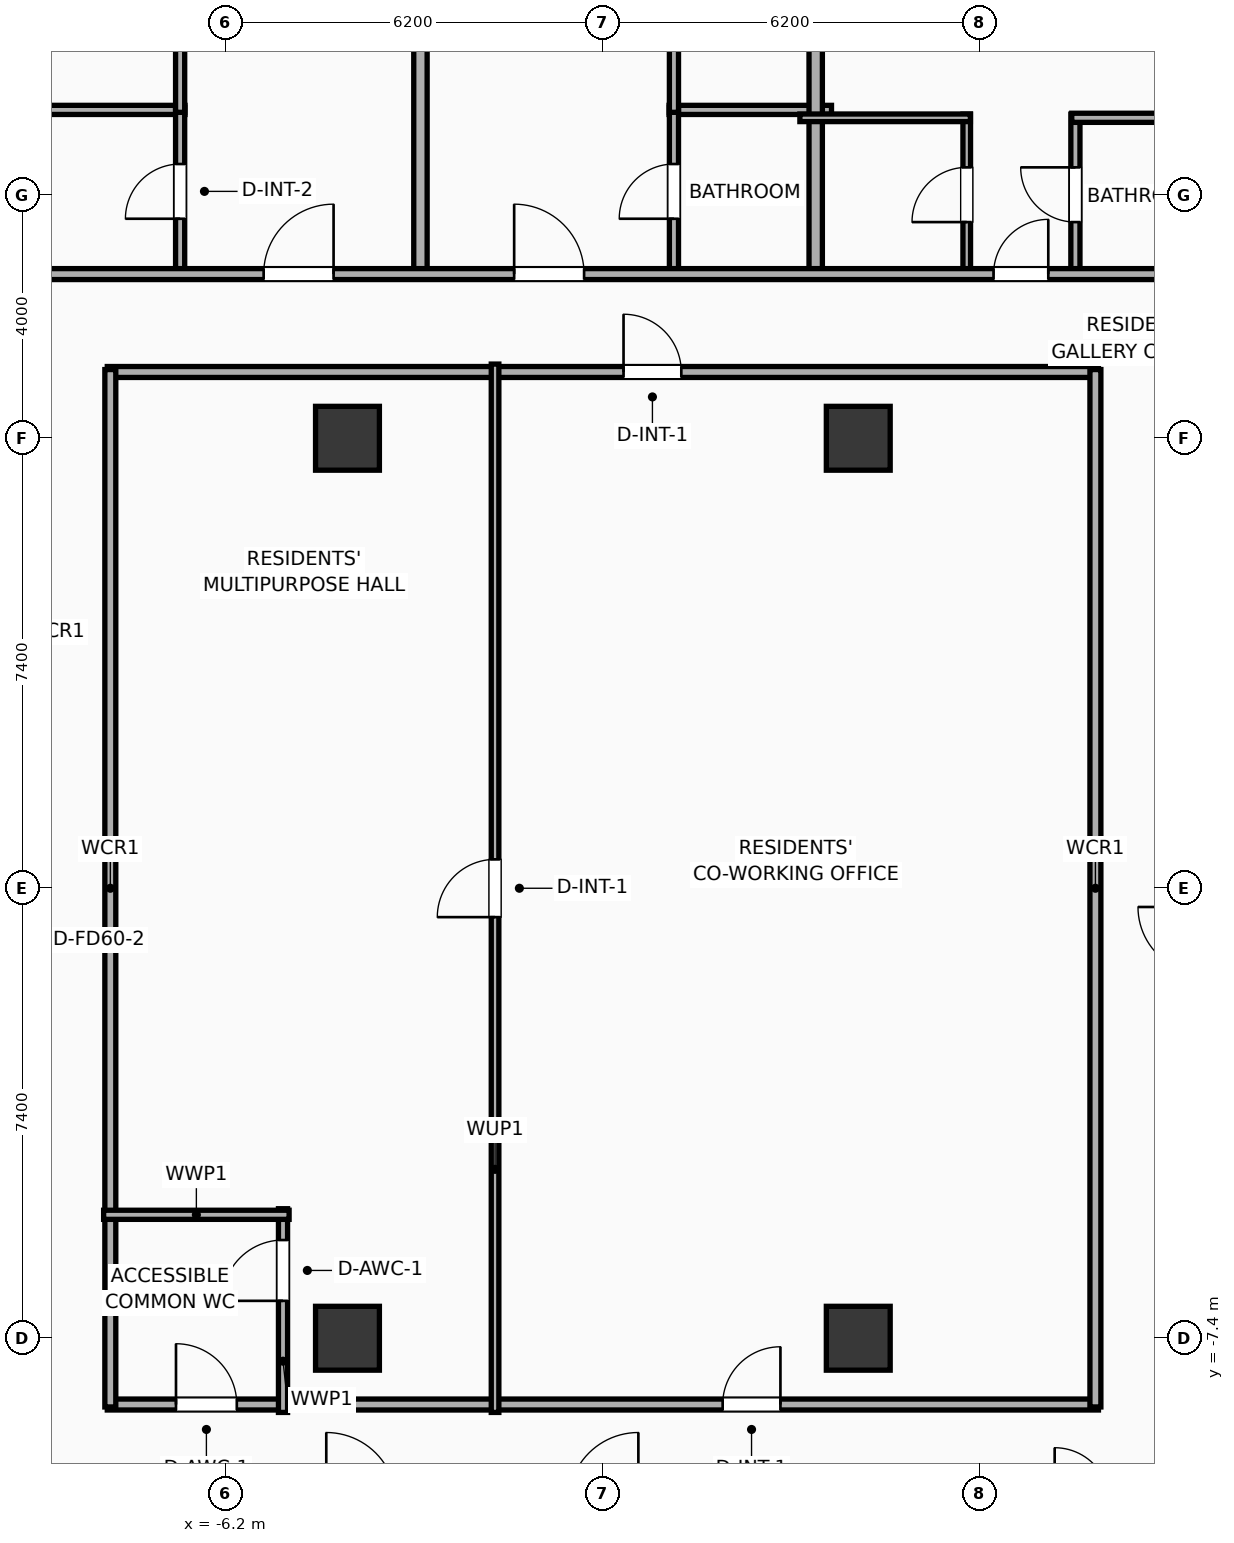
"""IFC4 building model, lengths in metres.
Left out: names, types, materials, properties, quantities, classifications, styles, units other than length and angle.
Written with IfcOpenShell. Run it as: python <this file> out.ifc"""

import sys

from ifc_helpers import new_model, si_unit, direction, frame, frame_2d, origin, origin_2d, place, context, subcontext, project, spatial, rectangle, extrude, element, fill, save


model = new_model("IFC4")
c1 = context("Model", 3, precision=1e-05, world=origin(), true_north=direction((0.0, 1.0)))
c2 = subcontext(c1, "Body", "Model", "MODEL_VIEW")
j1 = project(units=[si_unit("LENGTHUNIT", "METRE"), si_unit("PLANEANGLEUNIT", "RADIAN")], contexts=[c1])
p1 = place(None, origin())
s1 = spatial("IfcSite", under=j1, at=p1, CompositionType="ELEMENT")
p2 = place(p1, origin())
s2 = spatial("IfcBuilding", under=s1, at=p2, CompositionType="ELEMENT")
p3 = place(p2, frame((0.0, 0.0, 128.7)))
s3 = spatial("IfcBuildingStorey", under=s2, at=p3, CompositionType="ELEMENT", Elevation=128.7)
for number, where, z_axis, x_axis in (
    (1, (-4.2, -7.4, 0.0), (0.0, 0.0, 1.0), (1.0, 0.0, 0.0)),
    (2, (-4.2, 7.4, 0.0), (0.0, 0.0, 1.0), (1.0, 0.0, 0.0)),
    (3, (4.2, -7.4, 0.0), (0.0, 0.0, 1.0), (1.0, 0.0, 0.0)),
    (4, (4.2, 7.4, 0.0), (0.0, 0.0, 1.0), (1.0, 0.0, 0.0)),
):
    element("IfcColumn", number, at=place(p3, frame(where, z_axis=z_axis, x_axis=x_axis)), inside=s3, PredefinedType="COLUMN", context=c2, shape_type="SweptSolid", body=[
        extrude(rectangle(XDim=1.05, YDim=1.05, at=origin_2d()), origin(), (0.0, 0.0, 1.0), 3.9),
    ])
p4 = place(p3, frame((-8.15, 8.49, 0.0), z_axis=(0.0, 0.0, 1.0), x_axis=(1.0, 0.0, 0.0)))
e5 = element("IfcWall", 5, at=p4, inside=s3, PredefinedType="PARTITIONING", context=c2, shape_type="SweptSolid", body=[
    extrude(rectangle(XDim=16.3, YDim=0.18, at=frame_2d((8.15, 0.0))), origin(), (0.0, 0.0, 1.0), 3.65),
])
p5 = place(p4, frame((8.49, 0.0, 0.0)))
e6 = element("IfcOpeningElement", 6, at=p5, cuts=e5, PredefinedType="OPENING", context=c2, shape_type="SweptSolid", body=[
    extrude(rectangle(XDim=0.95, YDim=2.05, at=frame_2d((0.475, 1.025))), frame((0.0, 0.1, 0.0), z_axis=(0.0, -1.0, 0.0), x_axis=(1.0, 0.0, 0.0)), (0.0, 0.0, 1.0), 0.2),
])
p6 = place(p3, frame((-8.15, -8.49, 0.0), z_axis=(0.0, 0.0, 1.0), x_axis=(1.0, 0.0, 0.0)))
e7 = element("IfcWall", 7, at=p6, inside=s3, PredefinedType="PARTITIONING", context=c2, shape_type="SweptSolid", body=[
    extrude(rectangle(XDim=16.3, YDim=0.18, at=frame_2d((8.15, 0.0))), origin(), (0.0, 0.0, 1.0), 3.65),
])
p7 = place(p6, frame((1.13, 0.0, 0.0)))
e8 = element("IfcOpeningElement", 8, at=p7, cuts=e7, PredefinedType="OPENING", context=c2, shape_type="SweptSolid", body=[
    extrude(rectangle(XDim=1.0, YDim=2.05, at=frame_2d((0.5, 1.025))), frame((0.0, 0.1, 0.0), z_axis=(0.0, -1.0, 0.0), x_axis=(1.0, 0.0, 0.0)), (0.0, 0.0, 1.0), 0.2),
])
p8 = place(p6, frame((10.12, 0.0, 0.0)))
e9 = element("IfcOpeningElement", 9, at=p8, cuts=e7, PredefinedType="OPENING", context=c2, shape_type="SweptSolid", body=[
    extrude(rectangle(XDim=0.95, YDim=2.05, at=frame_2d((0.475, 1.025))), frame((0.0, 0.1, 0.0), z_axis=(0.0, -1.0, 0.0), x_axis=(1.0, 0.0, 0.0)), (0.0, 0.0, 1.0), 0.2),
])
for number, where, z_axis, x_axis in (
    (10, (-8.1, -8.53, 0.0), (0.0, 0.0, 1.0), (0.0, 1.0, 0.0)),
    (11, (8.1, -8.53, 0.0), (0.0, 0.0, 1.0), (0.0, 1.0, 0.0)),
):
    element("IfcWall", number, at=place(p3, frame(where, z_axis=z_axis, x_axis=x_axis)), inside=s3, PredefinedType="PARTITIONING", context=c2, shape_type="SweptSolid", body=[
        extrude(rectangle(XDim=17.06, YDim=0.18, at=frame_2d((8.53, 0.0))), origin(), (0.0, 0.0, 1.0), 3.65),
    ])
p9 = place(p3, frame((-5.26, -8.62, 0.0), z_axis=(0.0, 0.0, 1.0), x_axis=(0.0, 1.0, 0.0)))
e12 = element("IfcWall", 12, at=p9, inside=s3, PredefinedType="PLUMBINGWALL", context=c2, shape_type="SweptSolid", body=[
    extrude(rectangle(XDim=3.35, YDim=0.15, at=frame_2d((1.675, 0.0))), origin(), (0.0, 0.0, 1.0), 3.65),
])
p10 = place(p9, frame((1.835, 0.0, 0.0)))
e13 = element("IfcOpeningElement", 13, at=p10, cuts=e12, PredefinedType="OPENING", context=c2, shape_type="SweptSolid", body=[
    extrude(rectangle(XDim=1.0, YDim=2.05, at=frame_2d((0.5, 1.025))), frame((0.0, 0.085, 0.0), z_axis=(0.0, -1.0, 0.0), x_axis=(1.0, 0.0, 0.0)), (0.0, 0.0, 1.0), 0.17),
])
p11 = place(p3, frame((-8.21, -5.37, 0.0), z_axis=(0.0, 0.0, 1.0), x_axis=(1.0, 0.0, 0.0)))
e14 = element("IfcWall", 14, at=p11, inside=s3, PredefinedType="PLUMBINGWALL", context=c2, shape_type="SweptSolid", body=[
    extrude(rectangle(XDim=3.05, YDim=0.15, at=frame_2d((1.525, 0.0))), origin(), (0.0, 0.0, 1.0), 3.65),
])
p12 = place(p3, frame((-1.773, -8.62, 0.0), z_axis=(0.0, 0.0, 1.0), x_axis=(0.0, 1.0, 0.0)))
e15 = element("IfcWall", 15, at=p12, inside=s3, PredefinedType="PARTITIONING", context=c2, shape_type="SweptSolid", body=[
    extrude(rectangle(XDim=17.24, YDim=0.125, at=frame_2d((8.62, 0.0))), origin(), (0.0, 0.0, 1.0), 3.65),
])
p13 = place(p12, frame((8.145, 0.0, 0.0)))
e16 = element("IfcOpeningElement", 16, at=p13, cuts=e15, PredefinedType="OPENING", context=c2, shape_type="SweptSolid", body=[
    extrude(rectangle(XDim=0.95, YDim=2.05, at=frame_2d((0.475, 1.025))), frame((0.0, 0.073, 0.0), z_axis=(0.0, -1.0, 0.0), x_axis=(1.0, 0.0, 0.0)), (0.0, 0.0, 1.0), 0.145),
])
p14 = place(p3, frame((-9.76, 12.8, 0.0), z_axis=(0.0, 0.0, 1.0), x_axis=(1.0, 0.0, 0.0)))
e17 = element("IfcWall", 17, at=p14, inside=s3, PredefinedType="PLUMBINGWALL", context=c2, shape_type="SweptSolid", body=[
    extrude(rectangle(XDim=2.888, YDim=0.15, at=frame_2d((1.444, 0.0))), origin(), (0.0, 0.0, 1.0), 3.65),
])
p15 = place(p3, frame((-6.952, 10.08, 0.0), z_axis=(0.0, 0.0, 1.0), x_axis=(0.0, 1.0, 0.0)))
e18 = element("IfcWall", 18, at=p15, inside=s3, PredefinedType="PLUMBINGWALL", context=c2, shape_type="SweptSolid", body=[
    extrude(rectangle(XDim=2.76, YDim=0.15, at=frame_2d((1.38, 0.0))), origin(), (0.0, 0.0, 1.0), 3.65),
])
p16 = place(p15, frame((0.93, 0.0, 0.0)))
e19 = element("IfcOpeningElement", 19, at=p16, cuts=e18, PredefinedType="OPENING", context=c2, shape_type="SweptSolid", body=[
    extrude(rectangle(XDim=0.9, YDim=2.05, at=frame_2d((0.45, 1.025))), frame((0.0, 0.085, 0.0), z_axis=(0.0, -1.0, 0.0), x_axis=(1.0, 0.0, 0.0)), (0.0, 0.0, 1.0), 0.17),
])
p17 = place(p3, frame((-6.952, 12.76, 0.0), z_axis=(0.0, 0.0, 1.0), x_axis=(0.0, 1.0, 0.0)))
e20 = element("IfcWall", 20, at=p17, inside=s3, PredefinedType="PLUMBINGWALL", context=c2, shape_type="SweptSolid", body=[
    extrude(rectangle(XDim=8.898, YDim=0.15, at=frame_2d((4.449, 0.0))), origin(), (0.0, 0.0, 1.0), 3.65),
])
p18 = place(p17, frame((3.999, 0.0, 0.0)))
e21 = element("IfcOpeningElement", 21, at=p18, cuts=e20, PredefinedType="OPENING", context=c2, shape_type="SweptSolid", body=[
    extrude(rectangle(XDim=0.9, YDim=2.05, at=frame_2d((0.45, 1.025))), frame((0.0, 0.085, 0.0), z_axis=(0.0, -1.0, 0.0), x_axis=(1.0, 0.0, 0.0)), (0.0, 0.0, 1.0), 0.17),
])
p19 = place(p3, frame((-3.0, 10.02, 0.0), z_axis=(0.0, 0.0, 1.0), x_axis=(0.0, 1.0, 0.0)))
e22 = element("IfcWall", 22, at=p19, inside=s3, PredefinedType="PARTITIONING", context=c2, shape_type="SweptSolid", body=[
    extrude(rectangle(XDim=11.59, YDim=0.22, at=frame_2d((5.795, 0.0))), origin(), (0.0, 0.0, 1.0), 3.65),
])
p20 = place(p3, frame((1.089, 12.8, 0.0), z_axis=(0.0, 0.0, 1.0), x_axis=(1.0, 0.0, 0.0)))
e23 = element("IfcWall", 23, at=p20, inside=s3, PredefinedType="PLUMBINGWALL", context=c2, shape_type="SweptSolid", body=[
    extrude(rectangle(XDim=2.671, YDim=0.15, at=frame_2d((1.335, 0.0))), origin(), (0.0, 0.0, 1.0), 3.65),
])
p21 = place(p3, frame((1.169, 10.08, 0.0), z_axis=(0.0, 0.0, 1.0), x_axis=(0.0, 1.0, 0.0)))
e24 = element("IfcWall", 24, at=p21, inside=s3, PredefinedType="PLUMBINGWALL", context=c2, shape_type="SweptSolid", body=[
    extrude(rectangle(XDim=2.76, YDim=0.15, at=frame_2d((1.38, 0.0))), origin(), (0.0, 0.0, 1.0), 3.65),
])
p22 = place(p21, frame((0.93, 0.0, 0.0)))
e25 = element("IfcOpeningElement", 25, at=p22, cuts=e24, PredefinedType="OPENING", context=c2, shape_type="SweptSolid", body=[
    extrude(rectangle(XDim=0.9, YDim=2.05, at=frame_2d((0.45, 1.025))), frame((0.0, 0.085, 0.0), z_axis=(0.0, -1.0, 0.0), x_axis=(1.0, 0.0, 0.0)), (0.0, 0.0, 1.0), 0.17),
])
p23 = place(p3, frame((1.169, 12.76, 0.0), z_axis=(0.0, 0.0, 1.0), x_axis=(0.0, 1.0, 0.0)))
e26 = element("IfcWall", 26, at=p23, inside=s3, PredefinedType="PLUMBINGWALL", context=c2, shape_type="SweptSolid", body=[
    extrude(rectangle(XDim=8.898, YDim=0.15, at=frame_2d((4.449, 0.0))), origin(), (0.0, 0.0, 1.0), 3.65),
])
p24 = place(p23, frame((3.999, 0.0, 0.0)))
e27 = element("IfcOpeningElement", 27, at=p24, cuts=e26, PredefinedType="OPENING", context=c2, shape_type="SweptSolid", body=[
    extrude(rectangle(XDim=0.9, YDim=2.05, at=frame_2d((0.45, 1.025))), frame((0.0, 0.085, 0.0), z_axis=(0.0, -1.0, 0.0), x_axis=(1.0, 0.0, 0.0)), (0.0, 0.0, 1.0), 0.17),
])
p25 = place(p3, frame((3.5, 10.02, 0.0), z_axis=(0.0, 0.0, 1.0), x_axis=(0.0, 1.0, 0.0)))
e28 = element("IfcWall", 28, at=p25, inside=s3, PredefinedType="PARTITIONING", context=c2, shape_type="SweptSolid", body=[
    extrude(rectangle(XDim=11.59, YDim=0.22, at=frame_2d((5.795, 0.0))), origin(), (0.0, 0.0, 1.0), 3.65),
])
p26 = place(p3, frame((5.984, 10.08, 0.0), z_axis=(0.0, 0.0, 1.0), x_axis=(0.0, 1.0, 0.0)))
e29 = element("IfcWall", 29, at=p26, inside=s3, PredefinedType="PARTITIONING", context=c2, shape_type="SweptSolid", body=[
    extrude(rectangle(XDim=2.65, YDim=0.125, at=frame_2d((1.325, 0.0))), origin(), (0.0, 0.0, 1.0), 3.65),
])
p27 = place(p26, frame((0.875, 0.0, 0.0)))
e30 = element("IfcOpeningElement", 30, at=p27, cuts=e29, PredefinedType="OPENING", context=c2, shape_type="SweptSolid", body=[
    extrude(rectangle(XDim=0.9, YDim=2.05, at=frame_2d((0.45, 1.025))), frame((0.0, 0.073, 0.0), z_axis=(0.0, -1.0, 0.0), x_axis=(1.0, 0.0, 0.0)), (0.0, 0.0, 1.0), 0.145),
])
p28 = place(p3, frame((7.771, 10.08, 0.0), z_axis=(0.0, 0.0, 1.0), x_axis=(0.0, 1.0, 0.0)))
e31 = element("IfcWall", 31, at=p28, inside=s3, PredefinedType="PLUMBINGWALL", context=c2, shape_type="SweptSolid", body=[
    extrude(rectangle(XDim=2.65, YDim=0.15, at=frame_2d((1.325, 0.0))), origin(), (0.0, 0.0, 1.0), 3.65),
])
p29 = place(p28, frame((0.875, 0.0, 0.0)))
e32 = element("IfcOpeningElement", 32, at=p29, cuts=e31, PredefinedType="OPENING", context=c2, shape_type="SweptSolid", body=[
    extrude(rectangle(XDim=0.9, YDim=2.05, at=frame_2d((0.45, 1.025))), frame((0.0, 0.085, 0.0), z_axis=(0.0, -1.0, 0.0), x_axis=(1.0, 0.0, 0.0)), (0.0, 0.0, 1.0), 0.17),
])
p30 = place(p3, frame((3.24, 12.67, 0.0), z_axis=(0.0, 0.0, 1.0), x_axis=(1.0, 0.0, 0.0)))
e33 = element("IfcWall", 33, at=p30, inside=s3, PredefinedType="PARTITIONING", context=c2, shape_type="SweptSolid", body=[
    extrude(rectangle(XDim=2.804, YDim=0.125, at=frame_2d((1.402, 0.0))), origin(), (0.0, 0.0, 1.0), 3.65),
])
p31 = place(p3, frame((7.711, 12.67, 0.0), z_axis=(0.0, 0.0, 1.0), x_axis=(1.0, 0.0, 0.0)))
e34 = element("IfcWall", 34, at=p31, inside=s3, PredefinedType="PLUMBINGWALL", context=c2, shape_type="SweptSolid", body=[
    extrude(rectangle(XDim=2.549, YDim=0.15, at=frame_2d((1.274, 0.0))), origin(), (0.0, 0.0, 1.0), 3.65),
])
p32 = place(p3, frame((-29.21, 10.1, 0.0), z_axis=(0.0, 0.0, 1.0), x_axis=(1.0, 0.0, 0.0)))
e35 = element("IfcWall", 35, at=p32, inside=s3, PredefinedType="PARTITIONING", context=c2, shape_type="SweptSolid", body=[
    extrude(rectangle(XDim=62.42, YDim=0.18, at=frame_2d((31.21, 0.0))), origin(), (0.0, 0.0, 1.0), 3.65),
])
p33 = place(p32, frame((3.033, 0.0, 0.0)))
e36 = element("IfcOpeningElement", 36, at=p33, cuts=e35, PredefinedType="OPENING", context=c2, shape_type="SweptSolid", body=[
    extrude(rectangle(XDim=0.9, YDim=2.05, at=frame_2d((0.45, 1.025))), frame((0.0, 0.1, 0.0), z_axis=(0.0, -1.0, 0.0), x_axis=(1.0, 0.0, 0.0)), (0.0, 0.0, 1.0), 0.2),
])
p34 = place(p32, frame((10.573, 0.0, 0.0)))
e37 = element("IfcOpeningElement", 37, at=p34, cuts=e35, PredefinedType="OPENING", context=c2, shape_type="SweptSolid", body=[
    extrude(rectangle(XDim=1.15, YDim=2.05, at=frame_2d((0.575, 1.025))), frame((0.0, 0.1, 0.0), z_axis=(0.0, -1.0, 0.0), x_axis=(1.0, 0.0, 0.0)), (0.0, 0.0, 1.0), 0.2),
])
p35 = place(p32, frame((16.135, 0.0, 0.0)))
e38 = element("IfcOpeningElement", 38, at=p35, cuts=e35, PredefinedType="OPENING", context=c2, shape_type="SweptSolid", body=[
    extrude(rectangle(XDim=0.9, YDim=2.05, at=frame_2d((0.45, 1.025))), frame((0.0, 0.1, 0.0), z_axis=(0.0, -1.0, 0.0), x_axis=(1.0, 0.0, 0.0)), (0.0, 0.0, 1.0), 0.2),
])
p36 = place(p32, frame((23.632, 0.0, 0.0)))
e39 = element("IfcOpeningElement", 39, at=p36, cuts=e35, PredefinedType="OPENING", context=c2, shape_type="SweptSolid", body=[
    extrude(rectangle(XDim=1.15, YDim=2.05, at=frame_2d((0.575, 1.025))), frame((0.0, 0.1, 0.0), z_axis=(0.0, -1.0, 0.0), x_axis=(1.0, 0.0, 0.0)), (0.0, 0.0, 1.0), 0.2),
])
p37 = place(p32, frame((27.751, 0.0, 0.0)))
e40 = element("IfcOpeningElement", 40, at=p37, cuts=e35, PredefinedType="OPENING", context=c2, shape_type="SweptSolid", body=[
    extrude(rectangle(XDim=1.15, YDim=2.05, at=frame_2d((0.575, 1.025))), frame((0.0, 0.1, 0.0), z_axis=(0.0, -1.0, 0.0), x_axis=(1.0, 0.0, 0.0)), (0.0, 0.0, 1.0), 0.2),
])
p38 = place(p32, frame((35.635, 0.0, 0.0)))
e41 = element("IfcOpeningElement", 41, at=p38, cuts=e35, PredefinedType="OPENING", context=c2, shape_type="SweptSolid", body=[
    extrude(rectangle(XDim=0.9, YDim=2.05, at=frame_2d((0.45, 1.025))), frame((0.0, 0.1, 0.0), z_axis=(0.0, -1.0, 0.0), x_axis=(1.0, 0.0, 0.0)), (0.0, 0.0, 1.0), 0.2),
])
p39 = place(p32, frame((40.697, 0.0, 0.0)))
e42 = element("IfcOpeningElement", 42, at=p39, cuts=e35, PredefinedType="OPENING", context=c2, shape_type="SweptSolid", body=[
    extrude(rectangle(XDim=1.15, YDim=2.05, at=frame_2d((0.575, 1.025))), frame((0.0, 0.1, 0.0), z_axis=(0.0, -1.0, 0.0), x_axis=(1.0, 0.0, 0.0)), (0.0, 0.0, 1.0), 0.2),
])
p40 = place(p32, frame((48.637, 0.0, 0.0)))
e43 = element("IfcOpeningElement", 43, at=p40, cuts=e35, PredefinedType="OPENING", context=c2, shape_type="SweptSolid", body=[
    extrude(rectangle(XDim=0.9, YDim=2.05, at=frame_2d((0.45, 1.025))), frame((0.0, 0.1, 0.0), z_axis=(0.0, -1.0, 0.0), x_axis=(1.0, 0.0, 0.0)), (0.0, 0.0, 1.0), 0.2),
])
p41 = place(p32, frame((57.213, 0.0, 0.0)))
e44 = element("IfcOpeningElement", 44, at=p41, cuts=e35, PredefinedType="OPENING", context=c2, shape_type="SweptSolid", body=[
    extrude(rectangle(XDim=1.15, YDim=2.05, at=frame_2d((0.575, 1.025))), frame((0.0, 0.1, 0.0), z_axis=(0.0, -1.0, 0.0), x_axis=(1.0, 0.0, 0.0)), (0.0, 0.0, 1.0), 0.2),
])
p42 = place(p5, origin())
e45 = element("IfcDoor", 45, at=p42, inside=s3, OperationType="SINGLE_SWING_LEFT", PredefinedType="DOOR", context=c2, shape_type="SweptSolid", body=[
    extrude(rectangle(XDim=0.95, YDim=2.05, at=frame_2d((0.475, 1.025))), frame((0.0, 0.025, 0.0), z_axis=(0.0, -1.0, 0.0), x_axis=(1.0, 0.0, 0.0)), (0.0, 0.0, 1.0), 0.05),
])
fill(e6, e45)
p43 = place(p7, origin())
e46 = element("IfcDoor", 46, at=p43, inside=s3, OperationType="SINGLE_SWING_LEFT", PredefinedType="DOOR", context=c2, shape_type="SweptSolid", body=[
    extrude(rectangle(XDim=1.0, YDim=2.05, at=frame_2d((0.5, 1.025))), frame((0.0, 0.025, 0.0), z_axis=(0.0, -1.0, 0.0), x_axis=(1.0, 0.0, 0.0)), (0.0, 0.0, 1.0), 0.05),
])
fill(e8, e46)
p44 = place(p8, origin())
e47 = element("IfcDoor", 47, at=p44, inside=s3, OperationType="SINGLE_SWING_RIGHT", PredefinedType="DOOR", context=c2, shape_type="SweptSolid", body=[
    extrude(rectangle(XDim=0.95, YDim=2.05, at=frame_2d((0.475, 1.025))), frame((0.0, 0.025, 0.0), z_axis=(0.0, -1.0, 0.0), x_axis=(1.0, 0.0, 0.0)), (0.0, 0.0, 1.0), 0.05),
])
fill(e9, e47)
p45 = place(p10, origin())
e48 = element("IfcDoor", 48, at=p45, inside=s3, OperationType="SINGLE_SWING_LEFT", PredefinedType="DOOR", context=c2, shape_type="SweptSolid", body=[
    extrude(rectangle(XDim=1.0, YDim=2.05, at=frame_2d((0.5, 1.025))), frame((0.0, 0.025, 0.0), z_axis=(0.0, -1.0, 0.0), x_axis=(1.0, 0.0, 0.0)), (0.0, 0.0, 1.0), 0.05),
])
fill(e13, e48)
p46 = place(p13, origin())
e49 = element("IfcDoor", 49, at=p46, inside=s3, OperationType="SINGLE_SWING_LEFT", PredefinedType="DOOR", context=c2, shape_type="SweptSolid", body=[
    extrude(rectangle(XDim=0.95, YDim=2.05, at=frame_2d((0.475, 1.025))), frame((0.0, 0.025, 0.0), z_axis=(0.0, -1.0, 0.0), x_axis=(1.0, 0.0, 0.0)), (0.0, 0.0, 1.0), 0.05),
])
fill(e16, e49)
p47 = place(p16, origin())
e50 = element("IfcDoor", 50, at=p47, inside=s3, OperationType="SINGLE_SWING_LEFT", PredefinedType="DOOR", context=c2, shape_type="SweptSolid", body=[
    extrude(rectangle(XDim=0.9, YDim=2.05, at=frame_2d((0.45, 1.025))), frame((0.0, 0.025, 0.0), z_axis=(0.0, -1.0, 0.0), x_axis=(1.0, 0.0, 0.0)), (0.0, 0.0, 1.0), 0.05),
])
fill(e19, e50)
p48 = place(p22, origin())
e51 = element("IfcDoor", 51, at=p48, inside=s3, OperationType="SINGLE_SWING_LEFT", PredefinedType="DOOR", context=c2, shape_type="SweptSolid", body=[
    extrude(rectangle(XDim=0.9, YDim=2.05, at=frame_2d((0.45, 1.025))), frame((0.0, 0.025, 0.0), z_axis=(0.0, -1.0, 0.0), x_axis=(1.0, 0.0, 0.0)), (0.0, 0.0, 1.0), 0.05),
])
fill(e25, e51)
p49 = place(p27, origin())
e52 = element("IfcDoor", 52, at=p49, inside=s3, OperationType="SINGLE_SWING_LEFT", PredefinedType="DOOR", context=c2, shape_type="SweptSolid", body=[
    extrude(rectangle(XDim=0.9, YDim=2.05, at=frame_2d((0.45, 1.025))), frame((0.0, 0.025, 0.0), z_axis=(0.0, -1.0, 0.0), x_axis=(1.0, 0.0, 0.0)), (0.0, 0.0, 1.0), 0.05),
])
fill(e30, e52)
p50 = place(p29, origin())
e53 = element("IfcDoor", 53, at=p50, inside=s3, OperationType="SINGLE_SWING_RIGHT", PredefinedType="DOOR", context=c2, shape_type="SweptSolid", body=[
    extrude(rectangle(XDim=0.9, YDim=2.05, at=frame_2d((0.45, 1.025))), frame((0.0, 0.025, 0.0), z_axis=(0.0, -1.0, 0.0), x_axis=(1.0, 0.0, 0.0)), (0.0, 0.0, 1.0), 0.05),
])
fill(e32, e53)
p51 = place(p36, origin())
e54 = element("IfcDoor", 54, at=p51, inside=s3, OperationType="SINGLE_SWING_RIGHT", PredefinedType="DOOR", context=c2, shape_type="SweptSolid", body=[
    extrude(rectangle(XDim=1.15, YDim=2.05, at=frame_2d((0.575, 1.025))), frame((0.0, 0.025, 0.0), z_axis=(0.0, -1.0, 0.0), x_axis=(1.0, 0.0, 0.0)), (0.0, 0.0, 1.0), 0.05),
])
fill(e39, e54)
p52 = place(p37, origin())
e55 = element("IfcDoor", 55, at=p52, inside=s3, OperationType="SINGLE_SWING_LEFT", PredefinedType="DOOR", context=c2, shape_type="SweptSolid", body=[
    extrude(rectangle(XDim=1.15, YDim=2.05, at=frame_2d((0.575, 1.025))), frame((0.0, 0.025, 0.0), z_axis=(0.0, -1.0, 0.0), x_axis=(1.0, 0.0, 0.0)), (0.0, 0.0, 1.0), 0.05),
])
fill(e40, e55)
p53 = place(p38, origin())
e56 = element("IfcDoor", 56, at=p53, inside=s3, OperationType="SINGLE_SWING_RIGHT", PredefinedType="DOOR", context=c2, shape_type="SweptSolid", body=[
    extrude(rectangle(XDim=0.9, YDim=2.05, at=frame_2d((0.45, 1.025))), frame((0.0, 0.025, 0.0), z_axis=(0.0, -1.0, 0.0), x_axis=(1.0, 0.0, 0.0)), (0.0, 0.0, 1.0), 0.05),
])
fill(e41, e56)
save(model, sys.argv[1])
